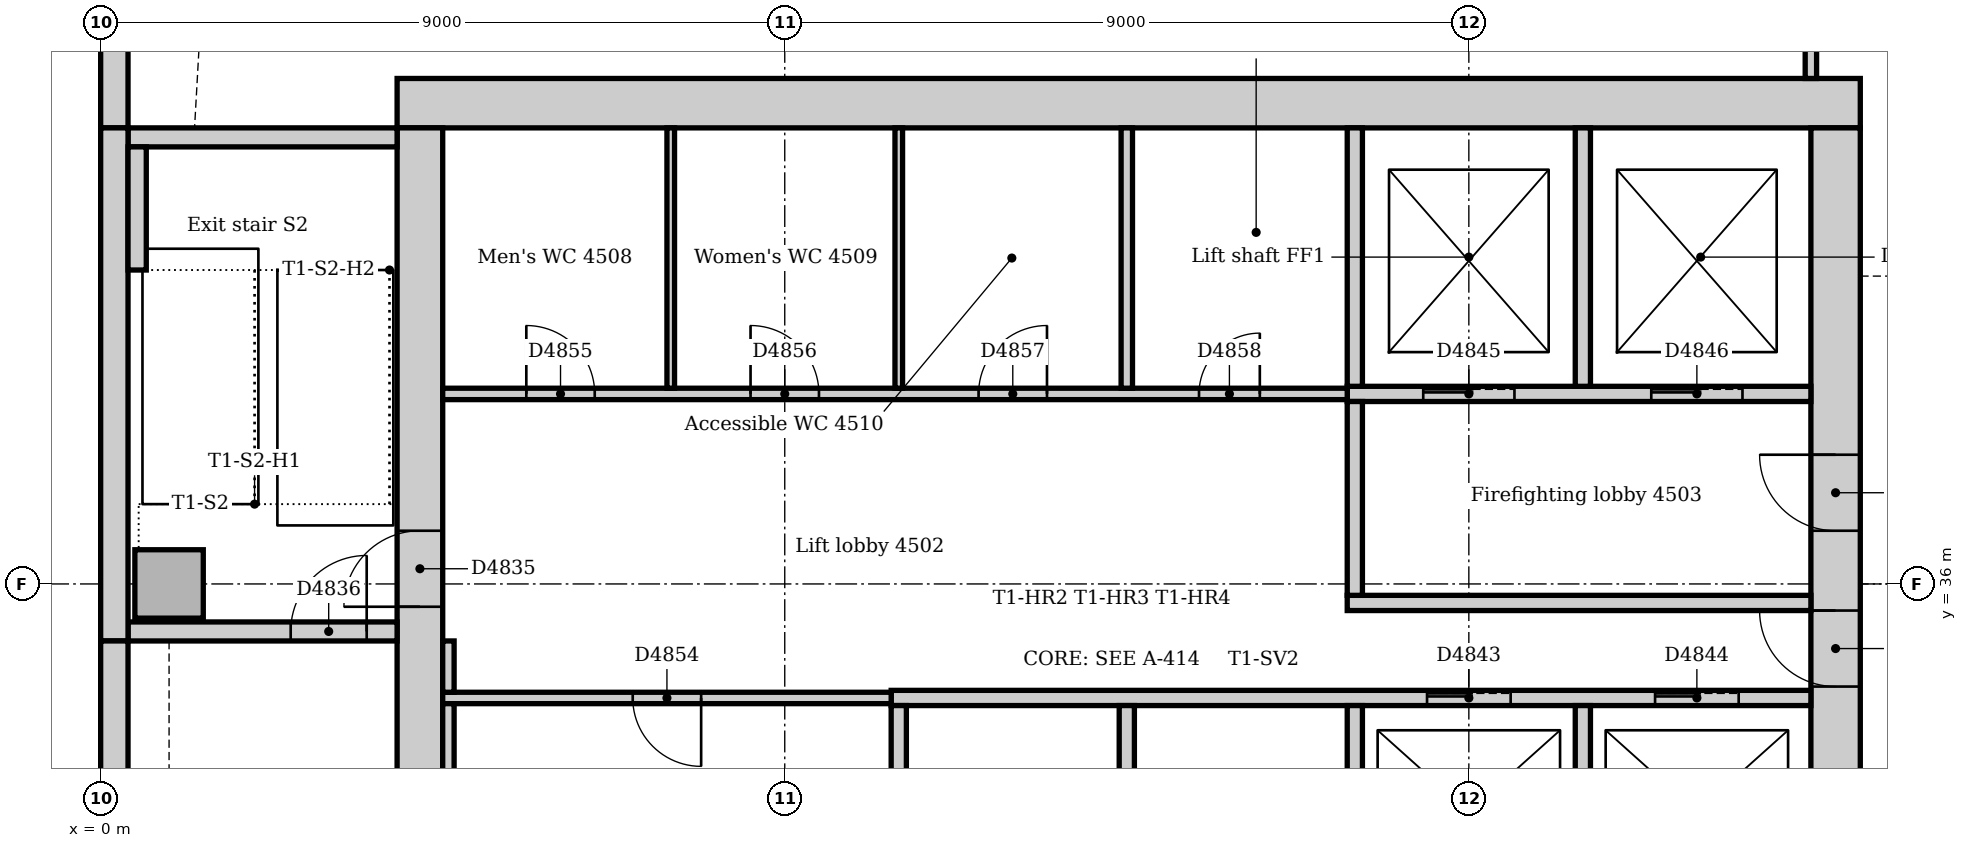
"""IFC4 building model, lengths in metres.
Left out: names, types, materials, properties, quantities, classifications, styles, units other than length and angle.
Written with IfcOpenShell. Run it as: python <this file> out.ifc"""

import sys

from ifc_helpers import new_model, si_unit, direction, frame, frame_2d, origin, origin_2d, place, context, subcontext, project, spatial, rectangle, extrude, element, fill, save


model = new_model("IFC4")
c1 = context("Model", 3, precision=1e-05, world=origin(), true_north=direction((0.0, 1.0)))
c2 = subcontext(c1, "Body", "Model", "MODEL_VIEW")
j1 = project(units=[si_unit("LENGTHUNIT", "METRE"), si_unit("PLANEANGLEUNIT", "RADIAN")], contexts=[c1])
p1 = place(None, origin())
s1 = spatial("IfcSite", under=j1, at=p1, CompositionType="ELEMENT")
p2 = place(p1, origin())
s2 = spatial("IfcBuilding", under=s1, at=p2, CompositionType="ELEMENT")
p3 = place(p2, frame((0.0, 0.0, 189.0)))
s3 = spatial("IfcBuildingStorey", under=s2, at=p3, CompositionType="ELEMENT", Elevation=189.0)
p4 = place(p3, frame((23.15, 42.325, 0.0), z_axis=(0.0, 0.0, 1.0), x_axis=(-1.0, 0.0, 0.0)))
e1 = element("IfcWall", 1, at=p4, inside=s3, PredefinedType="SOLIDWALL", context=c2, shape_type="SweptSolid", body=[
    extrude(rectangle(XDim=19.25, YDim=0.65, at=frame_2d((9.625, 0.0))), origin(), (0.0, 0.0, 1.0), 4.0),
])
p5 = place(p3, frame((22.825, 31.5, 0.0), z_axis=(0.0, 0.0, 1.0), x_axis=(0.0, 1.0, 0.0)))
e2 = element("IfcWall", 2, at=p5, inside=s3, PredefinedType="SOLIDWALL", context=c2, shape_type="SweptSolid", body=[
    extrude(rectangle(XDim=10.5, YDim=0.65, at=frame_2d((5.25, 0.0))), origin(), (0.0, 0.0, 1.0), 4.0),
])
p6 = place(p5, frame((3.15, 0.0, 0.0)))
e3 = element("IfcOpeningElement", 3, at=p6, cuts=e2, PredefinedType="OPENING", context=c2, shape_type="SweptSolid", body=[
    extrude(rectangle(XDim=1.0, YDim=2.1, at=frame_2d((0.5, 1.05))), frame((0.0, 0.335, 0.0), z_axis=(0.0, -1.0, 0.0), x_axis=(1.0, 0.0, 0.0)), (0.0, 0.0, 1.0), 0.67),
])
p7 = place(p5, frame((5.2, 0.0, 0.0)))
e4 = element("IfcOpeningElement", 4, at=p7, cuts=e2, PredefinedType="OPENING", context=c2, shape_type="SweptSolid", body=[
    extrude(rectangle(XDim=1.0, YDim=2.1, at=frame_2d((0.5, 1.05))), frame((0.0, 0.335, 0.0), z_axis=(0.0, -1.0, 0.0), x_axis=(1.0, 0.0, 0.0)), (0.0, 0.0, 1.0), 0.67),
])
p8 = place(p3, frame((4.2, 42.0, 0.0), z_axis=(0.0, 0.0, 1.0), x_axis=(0.0, -1.0, 0.0)))
e5 = element("IfcWall", 5, at=p8, inside=s3, PredefinedType="SOLIDWALL", context=c2, shape_type="SweptSolid", body=[
    extrude(rectangle(XDim=10.5, YDim=0.6, at=frame_2d((5.25, 0.0))), origin(), (0.0, 0.0, 1.0), 4.0),
])
p9 = place(p8, frame((5.3, 0.0, 0.0)))
e6 = element("IfcOpeningElement", 6, at=p9, cuts=e5, PredefinedType="OPENING", context=c2, shape_type="SweptSolid", body=[
    extrude(rectangle(XDim=1.0, YDim=2.1, at=frame_2d((0.5, 1.05))), frame((0.0, 0.31, 0.0), z_axis=(0.0, -1.0, 0.0), x_axis=(1.0, 0.0, 0.0)), (0.0, 0.0, 1.0), 0.62),
])
p10 = place(p3, frame((0.36, 35.375, 0.0), z_axis=(0.0, 0.0, 1.0), x_axis=(1.0, 0.0, 0.0)))
e7 = element("IfcWall", 7, at=p10, inside=s3, PredefinedType="SOLIDWALL", context=c2, shape_type="SweptSolid", body=[
    extrude(rectangle(XDim=3.54, YDim=0.25, at=frame_2d((1.77, 0.0))), origin(), (0.0, 0.0, 1.0), 4.0),
])
p11 = place(p10, frame((2.14, 0.0, 0.0)))
e8 = element("IfcOpeningElement", 8, at=p11, cuts=e7, PredefinedType="OPENING", context=c2, shape_type="SweptSolid", body=[
    extrude(rectangle(XDim=1.0, YDim=2.1, at=frame_2d((0.5, 1.05))), frame((0.0, 0.135, 0.0), z_axis=(0.0, -1.0, 0.0), x_axis=(1.0, 0.0, 0.0)), (0.0, 0.0, 1.0), 0.27),
])
p12 = place(p3, frame((3.9, 41.875, 0.0), z_axis=(0.0, 0.0, 1.0), x_axis=(-1.0, 0.0, 0.0)))
e9 = element("IfcWall", 9, at=p12, inside=s3, PredefinedType="SOLIDWALL", context=c2, shape_type="SweptSolid", body=[
    extrude(rectangle(XDim=3.54, YDim=0.25, at=frame_2d((1.77, 0.0))), origin(), (0.0, 0.0, 1.0), 4.0),
])
p13 = place(p3, frame((0.9, 36.0, 0.0), z_axis=(0.0, 0.0, 1.0), x_axis=(1.0, 0.0, 0.0)))
e10 = element("IfcColumn", 10, at=p13, inside=s3, PredefinedType="COLUMN", context=c2, shape_type="SweptSolid", body=[
    extrude(rectangle(XDim=0.9, YDim=0.9, at=origin_2d()), origin(), (0.0, 0.0, 1.0), 4.0),
])
p14 = place(p3, frame((0.18, 49.757, 0.0), z_axis=(0.0, 0.0, 1.0), x_axis=(0.0, -1.0, 0.0)))
e11 = element("IfcWall", 11, at=p14, inside=s3, PredefinedType="STANDARD", context=c2, shape_type="SweptSolid", body=[
    extrude(rectangle(XDim=7.757, YDim=0.36, at=frame_2d((3.879, 0.0))), origin(), (0.0, 0.0, 1.0), 3.7),
])
p15 = place(p14, frame((3.107, 0.0, 0.9)))
e12 = element("IfcOpeningElement", 12, at=p15, cuts=e11, PredefinedType="OPENING", context=c2, shape_type="SweptSolid", body=[
    extrude(rectangle(XDim=3.3, YDim=1.6, at=frame_2d((1.65, 0.8))), frame((0.0, 0.19, 0.0), z_axis=(0.0, -1.0, 0.0), x_axis=(1.0, 0.0, 0.0)), (0.0, 0.0, 1.0), 0.38),
])
p16 = place(p3, frame((0.18, 42.0, 0.0), z_axis=(0.0, 0.0, 1.0), x_axis=(0.0, -1.0, 0.0)))
e13 = element("IfcWall", 13, at=p16, inside=s3, PredefinedType="STANDARD", context=c2, shape_type="SweptSolid", body=[
    extrude(rectangle(XDim=6.75, YDim=0.36, at=frame_2d((3.375, 0.0))), origin(), (0.0, 0.0, 1.0), 3.7),
])
p17 = place(p3, frame((0.18, 35.25, 0.0), z_axis=(0.0, 0.0, 1.0), x_axis=(0.0, -1.0, 0.0)))
e14 = element("IfcWall", 14, at=p17, inside=s3, PredefinedType="STANDARD", context=c2, shape_type="SweptSolid", body=[
    extrude(rectangle(XDim=7.5, YDim=0.36, at=frame_2d((3.75, 0.0))), origin(), (0.0, 0.0, 1.0), 3.7),
])
p18 = place(p3, frame((0.48, 40.13, 0.0), z_axis=(0.0, 0.0, 1.0), x_axis=(0.0, 1.0, 0.0)))
e15 = element("IfcWall", 15, at=p18, inside=s3, PredefinedType="STANDARD", context=c2, shape_type="SweptSolid", body=[
    extrude(rectangle(XDim=1.62, YDim=0.24, at=frame_2d((0.81, 0.0))), origin(), (0.0, 0.0, 1.0), 4.0),
])
p19 = place(p3, frame((16.4, 35.75, 0.0), z_axis=(0.0, 0.0, 1.0), x_axis=(1.0, 0.0, 0.0)))
e16 = element("IfcWall", 16, at=p19, inside=s3, PredefinedType="PARTITIONING", context=c2, shape_type="SweptSolid", body=[
    extrude(rectangle(XDim=6.1, YDim=0.2, at=frame_2d((3.05, 0.0))), origin(), (0.0, 0.0, 1.0), 3.7),
])
p20 = place(p3, frame((16.4, 38.5, 0.0), z_axis=(0.0, 0.0, 1.0), x_axis=(1.0, 0.0, 0.0)))
e17 = element("IfcWall", 17, at=p20, inside=s3, PredefinedType="PARTITIONING", context=c2, shape_type="SweptSolid", body=[
    extrude(rectangle(XDim=6.1, YDim=0.2, at=frame_2d((3.05, 0.0))), origin(), (0.0, 0.0, 1.0), 3.7),
])
p21 = place(p20, frame((1.0, 0.0, 0.0)))
e18 = element("IfcOpeningElement", 18, at=p21, cuts=e17, PredefinedType="OPENING", context=c2, shape_type="SweptSolid", body=[
    extrude(rectangle(XDim=1.2, YDim=2.1, at=frame_2d((0.6, 1.05))), frame((0.0, 0.11, 0.0), z_axis=(0.0, -1.0, 0.0), x_axis=(1.0, 0.0, 0.0)), (0.0, 0.0, 1.0), 0.22),
])
p22 = place(p20, frame((4.0, 0.0, 0.0)))
e19 = element("IfcOpeningElement", 19, at=p22, cuts=e17, PredefinedType="OPENING", context=c2, shape_type="SweptSolid", body=[
    extrude(rectangle(XDim=1.2, YDim=2.1, at=frame_2d((0.6, 1.05))), frame((0.0, 0.11, 0.0), z_axis=(0.0, -1.0, 0.0), x_axis=(1.0, 0.0, 0.0)), (0.0, 0.0, 1.0), 0.22),
])
p23 = place(p3, frame((16.5, 35.85, 0.0), z_axis=(0.0, 0.0, 1.0), x_axis=(0.0, 1.0, 0.0)))
e20 = element("IfcWall", 20, at=p23, inside=s3, PredefinedType="PARTITIONING", context=c2, shape_type="SweptSolid", body=[
    extrude(rectangle(XDim=2.55, YDim=0.2, at=frame_2d((1.275, 0.0))), origin(), (0.0, 0.0, 1.0), 3.7),
])
p24 = place(p3, frame((10.4, 34.5, 0.0), z_axis=(0.0, 0.0, 1.0), x_axis=(1.0, 0.0, 0.0)))
e21 = element("IfcWall", 21, at=p24, inside=s3, PredefinedType="PARTITIONING", context=c2, shape_type="SweptSolid", body=[
    extrude(rectangle(XDim=12.1, YDim=0.2, at=frame_2d((6.05, 0.0))), origin(), (0.0, 0.0, 1.0), 3.7),
])
p25 = place(p24, frame((7.05, 0.0, 0.0)))
e22 = element("IfcOpeningElement", 22, at=p25, cuts=e21, PredefinedType="OPENING", context=c2, shape_type="SweptSolid", body=[
    extrude(rectangle(XDim=1.1, YDim=2.1, at=frame_2d((0.55, 1.05))), frame((0.0, 0.11, 0.0), z_axis=(0.0, -1.0, 0.0), x_axis=(1.0, 0.0, 0.0)), (0.0, 0.0, 1.0), 0.22),
])
p26 = place(p24, frame((10.05, 0.0, 0.0)))
e23 = element("IfcOpeningElement", 23, at=p26, cuts=e21, PredefinedType="OPENING", context=c2, shape_type="SweptSolid", body=[
    extrude(rectangle(XDim=1.1, YDim=2.1, at=frame_2d((0.55, 1.05))), frame((0.0, 0.11, 0.0), z_axis=(0.0, -1.0, 0.0), x_axis=(1.0, 0.0, 0.0)), (0.0, 0.0, 1.0), 0.22),
])
for number, where, z_axis, x_axis in (
    (24, (10.5, 31.75, 0.0), (0.0, 0.0, 1.0), (0.0, 1.0, 0.0)),
    (25, (13.5, 31.75, 0.0), (0.0, 0.0, 1.0), (0.0, 1.0, 0.0)),
    (26, (16.5, 31.75, 0.0), (0.0, 0.0, 1.0), (0.0, 1.0, 0.0)),
    (27, (19.5, 31.75, 0.0), (0.0, 0.0, 1.0), (0.0, 1.0, 0.0)),
):
    element("IfcWall", number, at=place(p3, frame(where, z_axis=z_axis, x_axis=x_axis)), inside=s3, PredefinedType="PARTITIONING", context=c2, shape_type="SweptSolid", body=[
        extrude(rectangle(XDim=2.65, YDim=0.2, at=frame_2d((1.325, 0.0))), origin(), (0.0, 0.0, 1.0), 3.7),
    ])
for number, where, z_axis, x_axis in (
    (28, (16.5, 38.6, 0.0), (0.0, 0.0, 1.0), (0.0, 1.0, 0.0)),
    (29, (19.5, 38.6, 0.0), (0.0, 0.0, 1.0), (0.0, 1.0, 0.0)),
):
    element("IfcWall", number, at=place(p3, frame(where, z_axis=z_axis, x_axis=x_axis)), inside=s3, PredefinedType="PARTITIONING", context=c2, shape_type="SweptSolid", body=[
        extrude(rectangle(XDim=3.4, YDim=0.2, at=frame_2d((1.7, 0.0))), origin(), (0.0, 0.0, 1.0), 3.7),
    ])
p27 = place(p3, frame((4.5, 38.5, 0.0), z_axis=(0.0, 0.0, 1.0), x_axis=(1.0, 0.0, 0.0)))
e30 = element("IfcWall", 30, at=p27, inside=s3, PredefinedType="PARTITIONING", context=c2, shape_type="SweptSolid", body=[
    extrude(rectangle(XDim=11.9, YDim=0.15, at=frame_2d((5.95, 0.0))), origin(), (0.0, 0.0, 1.0), 3.7),
])
p28 = place(p27, frame((1.1, 0.0, 0.0)))
e31 = element("IfcOpeningElement", 31, at=p28, cuts=e30, PredefinedType="OPENING", context=c2, shape_type="SweptSolid", body=[
    extrude(rectangle(XDim=0.9, YDim=2.1, at=frame_2d((0.45, 1.05))), frame((0.0, 0.085, 0.0), z_axis=(0.0, -1.0, 0.0), x_axis=(1.0, 0.0, 0.0)), (0.0, 0.0, 1.0), 0.17),
])
p29 = place(p27, frame((4.05, 0.0, 0.0)))
e32 = element("IfcOpeningElement", 32, at=p29, cuts=e30, PredefinedType="OPENING", context=c2, shape_type="SweptSolid", body=[
    extrude(rectangle(XDim=0.9, YDim=2.1, at=frame_2d((0.45, 1.05))), frame((0.0, 0.085, 0.0), z_axis=(0.0, -1.0, 0.0), x_axis=(1.0, 0.0, 0.0)), (0.0, 0.0, 1.0), 0.17),
])
p30 = place(p27, frame((7.05, 0.0, 0.0)))
e33 = element("IfcOpeningElement", 33, at=p30, cuts=e30, PredefinedType="OPENING", context=c2, shape_type="SweptSolid", body=[
    extrude(rectangle(XDim=0.9, YDim=2.1, at=frame_2d((0.45, 1.05))), frame((0.0, 0.085, 0.0), z_axis=(0.0, -1.0, 0.0), x_axis=(1.0, 0.0, 0.0)), (0.0, 0.0, 1.0), 0.17),
])
p31 = place(p27, frame((9.95, 0.0, 0.0)))
e34 = element("IfcOpeningElement", 34, at=p31, cuts=e30, PredefinedType="OPENING", context=c2, shape_type="SweptSolid", body=[
    extrude(rectangle(XDim=0.8, YDim=2.1, at=frame_2d((0.4, 1.05))), frame((0.0, 0.085, 0.0), z_axis=(0.0, -1.0, 0.0), x_axis=(1.0, 0.0, 0.0)), (0.0, 0.0, 1.0), 0.17),
])
p32 = place(p3, frame((4.5, 34.5, 0.0), z_axis=(0.0, 0.0, 1.0), x_axis=(1.0, 0.0, 0.0)))
e35 = element("IfcWall", 35, at=p32, inside=s3, PredefinedType="PARTITIONING", context=c2, shape_type="SweptSolid", body=[
    extrude(rectangle(XDim=5.9, YDim=0.15, at=frame_2d((2.95, 0.0))), origin(), (0.0, 0.0, 1.0), 3.7),
])
p33 = place(p32, frame((2.5, 0.0, 0.0)))
e36 = element("IfcOpeningElement", 36, at=p33, cuts=e35, PredefinedType="OPENING", context=c2, shape_type="SweptSolid", body=[
    extrude(rectangle(XDim=0.9, YDim=2.1, at=frame_2d((0.45, 1.05))), frame((0.0, 0.085, 0.0), z_axis=(0.0, -1.0, 0.0), x_axis=(1.0, 0.0, 0.0)), (0.0, 0.0, 1.0), 0.17),
])
p34 = place(p3, frame((4.575, 34.575, 0.0), z_axis=(0.0, 0.0, 1.0), x_axis=(0.0, 1.0, 0.0)))
e37 = element("IfcWall", 37, at=p34, inside=s3, PredefinedType="PARTITIONING", context=c2, shape_type="SweptSolid", body=[
    extrude(rectangle(XDim=0.675, YDim=0.15, at=frame_2d((0.338, 0.0))), origin(), (0.0, 0.0, 1.0), 3.7),
])
p35 = place(p3, frame((4.575, 31.75, 0.0), z_axis=(0.0, 0.0, 1.0), x_axis=(0.0, 1.0, 0.0)))
e38 = element("IfcWall", 38, at=p35, inside=s3, PredefinedType="PARTITIONING", context=c2, shape_type="SweptSolid", body=[
    extrude(rectangle(XDim=2.675, YDim=0.15, at=frame_2d((1.337, 0.0))), origin(), (0.0, 0.0, 1.0), 3.7),
])
p36 = place(p3, frame((22.5, 42.65, 0.0), z_axis=(0.0, 0.0, 1.0), x_axis=(0.0, 1.0, 0.0)))
e39 = element("IfcWall", 39, at=p36, inside=s3, PredefinedType="PARTITIONING", context=c2, shape_type="SweptSolid", body=[
    extrude(rectangle(XDim=1.825, YDim=0.15, at=frame_2d((0.912, 0.0))), origin(), (0.0, 0.0, 1.0), 3.7),
])
p37 = place(p3, frame((13.5, 38.575, 0.0), z_axis=(0.0, 0.0, 1.0), x_axis=(0.0, 1.0, 0.0)))
e40 = element("IfcWall", 40, at=p37, inside=s3, PredefinedType="PARTITIONING", context=c2, shape_type="SweptSolid", body=[
    extrude(rectangle(XDim=3.425, YDim=0.15, at=frame_2d((1.712, 0.0))), origin(), (0.0, 0.0, 1.0), 3.7),
])
for number, where, z_axis, x_axis in (
    (41, (7.5, 38.575, 0.0), (0.0, 0.0, 1.0), (0.0, 1.0, 0.0)),
    (42, (10.5, 38.575, 0.0), (0.0, 0.0, 1.0), (0.0, 1.0, 0.0)),
):
    element("IfcWall", number, at=place(p3, frame(where, z_axis=z_axis, x_axis=x_axis)), inside=s3, PredefinedType="PARTITIONING", context=c2, shape_type="SweptSolid", body=[
        extrude(rectangle(XDim=3.425, YDim=0.1, at=frame_2d((1.712, 0.0))), origin(), (0.0, 0.0, 1.0), 3.7),
    ])
p38 = place(p9, frame((1.0, 0.0, 0.0), z_axis=(0.0, 0.0, 1.0), x_axis=(-1.0, 0.0, 0.0)))
e43 = element("IfcDoor", 43, at=p38, inside=s3, OperationType="SINGLE_SWING_LEFT", PredefinedType="DOOR", context=c2, shape_type="SweptSolid", body=[
    extrude(rectangle(XDim=1.0, YDim=2.1, at=frame_2d((0.5, 1.05))), frame((0.0, 0.025, 0.0), z_axis=(0.0, -1.0, 0.0), x_axis=(1.0, 0.0, 0.0)), (0.0, 0.0, 1.0), 0.05),
])
fill(e6, e43)
p39 = place(p11, origin())
e44 = element("IfcDoor", 44, at=p39, inside=s3, OperationType="SINGLE_SWING_RIGHT", PredefinedType="DOOR", context=c2, shape_type="SweptSolid", body=[
    extrude(rectangle(XDim=1.0, YDim=2.1, at=frame_2d((0.5, 1.05))), frame((0.0, 0.025, 0.0), z_axis=(0.0, -1.0, 0.0), x_axis=(1.0, 0.0, 0.0)), (0.0, 0.0, 1.0), 0.05),
])
fill(e8, e44)
p40 = place(p25, origin())
e45 = element("IfcDoor", 45, at=p40, inside=s3, OperationType="SLIDING_TO_LEFT", PredefinedType="DOOR", context=c2, shape_type="SweptSolid", body=[
    extrude(rectangle(XDim=1.1, YDim=2.1, at=frame_2d((0.55, 1.05))), frame((0.0, 0.025, 0.0), z_axis=(0.0, -1.0, 0.0), x_axis=(1.0, 0.0, 0.0)), (0.0, 0.0, 1.0), 0.05),
])
fill(e22, e45)
p41 = place(p26, origin())
e46 = element("IfcDoor", 46, at=p41, inside=s3, OperationType="SLIDING_TO_LEFT", PredefinedType="DOOR", context=c2, shape_type="SweptSolid", body=[
    extrude(rectangle(XDim=1.1, YDim=2.1, at=frame_2d((0.55, 1.05))), frame((0.0, 0.025, 0.0), z_axis=(0.0, -1.0, 0.0), x_axis=(1.0, 0.0, 0.0)), (0.0, 0.0, 1.0), 0.05),
])
fill(e23, e46)
p42 = place(p21, origin())
e47 = element("IfcDoor", 47, at=p42, inside=s3, OperationType="SLIDING_TO_LEFT", PredefinedType="DOOR", context=c2, shape_type="SweptSolid", body=[
    extrude(rectangle(XDim=1.2, YDim=2.1, at=frame_2d((0.6, 1.05))), frame((0.0, 0.025, 0.0), z_axis=(0.0, -1.0, 0.0), x_axis=(1.0, 0.0, 0.0)), (0.0, 0.0, 1.0), 0.05),
])
fill(e18, e47)
p43 = place(p22, origin())
e48 = element("IfcDoor", 48, at=p43, inside=s3, OperationType="SLIDING_TO_LEFT", PredefinedType="DOOR", context=c2, shape_type="SweptSolid", body=[
    extrude(rectangle(XDim=1.2, YDim=2.1, at=frame_2d((0.6, 1.05))), frame((0.0, 0.025, 0.0), z_axis=(0.0, -1.0, 0.0), x_axis=(1.0, 0.0, 0.0)), (0.0, 0.0, 1.0), 0.05),
])
fill(e19, e48)
p44 = place(p6, origin())
e49 = element("IfcDoor", 49, at=p44, inside=s3, OperationType="SINGLE_SWING_RIGHT", PredefinedType="DOOR", context=c2, shape_type="SweptSolid", body=[
    extrude(rectangle(XDim=1.0, YDim=2.1, at=frame_2d((0.5, 1.05))), frame((0.0, 0.025, 0.0), z_axis=(0.0, -1.0, 0.0), x_axis=(1.0, 0.0, 0.0)), (0.0, 0.0, 1.0), 0.05),
])
fill(e3, e49)
p45 = place(p7, origin())
e50 = element("IfcDoor", 50, at=p45, inside=s3, OperationType="SINGLE_SWING_RIGHT", PredefinedType="DOOR", context=c2, shape_type="SweptSolid", body=[
    extrude(rectangle(XDim=1.0, YDim=2.1, at=frame_2d((0.5, 1.05))), frame((0.0, 0.025, 0.0), z_axis=(0.0, -1.0, 0.0), x_axis=(1.0, 0.0, 0.0)), (0.0, 0.0, 1.0), 0.05),
])
fill(e4, e50)
p46 = place(p33, frame((0.9, 0.0, 0.0), z_axis=(0.0, 0.0, 1.0), x_axis=(-1.0, 0.0, 0.0)))
e51 = element("IfcDoor", 51, at=p46, inside=s3, OperationType="SINGLE_SWING_LEFT", PredefinedType="DOOR", context=c2, shape_type="SweptSolid", body=[
    extrude(rectangle(XDim=0.9, YDim=2.1, at=frame_2d((0.45, 1.05))), frame((0.0, 0.025, 0.0), z_axis=(0.0, -1.0, 0.0), x_axis=(1.0, 0.0, 0.0)), (0.0, 0.0, 1.0), 0.05),
])
fill(e36, e51)
p47 = place(p28, origin())
e52 = element("IfcDoor", 52, at=p47, inside=s3, OperationType="SINGLE_SWING_LEFT", PredefinedType="DOOR", context=c2, shape_type="SweptSolid", body=[
    extrude(rectangle(XDim=0.9, YDim=2.1, at=frame_2d((0.45, 1.05))), frame((0.0, 0.025, 0.0), z_axis=(0.0, -1.0, 0.0), x_axis=(1.0, 0.0, 0.0)), (0.0, 0.0, 1.0), 0.05),
])
fill(e31, e52)
p48 = place(p29, origin())
e53 = element("IfcDoor", 53, at=p48, inside=s3, OperationType="SINGLE_SWING_LEFT", PredefinedType="DOOR", context=c2, shape_type="SweptSolid", body=[
    extrude(rectangle(XDim=0.9, YDim=2.1, at=frame_2d((0.45, 1.05))), frame((0.0, 0.025, 0.0), z_axis=(0.0, -1.0, 0.0), x_axis=(1.0, 0.0, 0.0)), (0.0, 0.0, 1.0), 0.05),
])
fill(e32, e53)
p49 = place(p30, origin())
e54 = element("IfcDoor", 54, at=p49, inside=s3, OperationType="SINGLE_SWING_RIGHT", PredefinedType="DOOR", context=c2, shape_type="SweptSolid", body=[
    extrude(rectangle(XDim=0.9, YDim=2.1, at=frame_2d((0.45, 1.05))), frame((0.0, 0.025, 0.0), z_axis=(0.0, -1.0, 0.0), x_axis=(1.0, 0.0, 0.0)), (0.0, 0.0, 1.0), 0.05),
])
fill(e33, e54)
p50 = place(p31, origin())
e55 = element("IfcDoor", 55, at=p50, inside=s3, OperationType="SINGLE_SWING_RIGHT", PredefinedType="DOOR", context=c2, shape_type="SweptSolid", body=[
    extrude(rectangle(XDim=0.8, YDim=2.1, at=frame_2d((0.4, 1.05))), frame((0.0, 0.025, 0.0), z_axis=(0.0, -1.0, 0.0), x_axis=(1.0, 0.0, 0.0)), (0.0, 0.0, 1.0), 0.05),
])
fill(e34, e55)
save(model, sys.argv[1])
